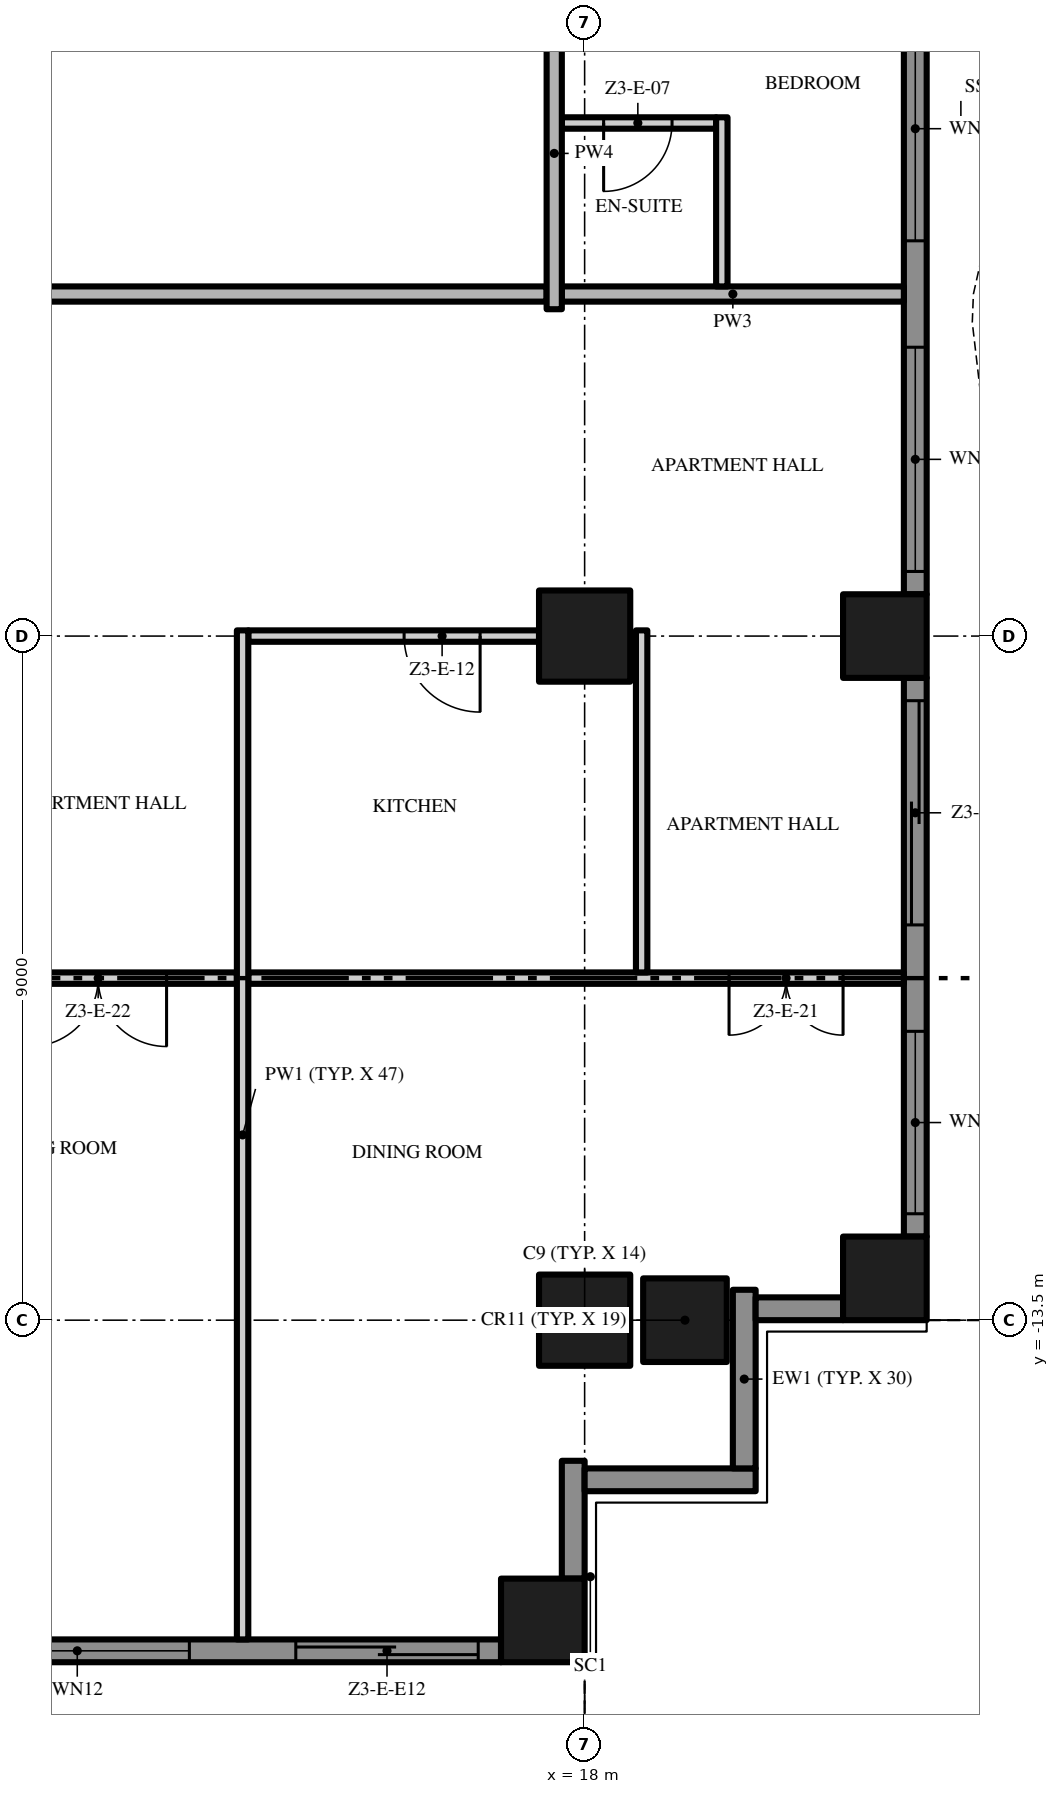
"""IFC4 building model, lengths in metres.
Left out: names, types, materials, properties, quantities, classifications, styles, units other than length and angle.
Written with IfcOpenShell. Run it as: python <this file> out.ifc"""

import sys

from ifc_helpers import new_model, si_unit, direction, frame, frame_2d, origin, origin_2d, place, context, subcontext, project, spatial, polyline, rectangle, outline, extrude, element, fill, save


model = new_model("IFC4")
c1 = context("Model", 3, precision=1e-05, world=origin(), true_north=direction((0.0, 1.0)))
c2 = subcontext(c1, "Body", "Model", "MODEL_VIEW")
j1 = project(units=[si_unit("LENGTHUNIT", "METRE"), si_unit("PLANEANGLEUNIT", "RADIAN")], contexts=[c1])
p1 = place(None, origin())
s1 = spatial("IfcSite", under=j1, at=p1, CompositionType="ELEMENT")
p2 = place(p1, origin())
s2 = spatial("IfcBuilding", under=s1, at=p2, CompositionType="ELEMENT")
p3 = place(p2, frame((0.0, 0.0, 170.6)))
s3 = spatial("IfcBuildingStorey", under=s2, at=p3, CompositionType="ELEMENT", Elevation=170.6)
p4 = place(p3, frame((18.0, -13.5, 0.0), z_axis=(0.0, 0.0, 1.0), x_axis=(1.0, 0.0, 0.0)))
e1 = element("IfcColumn", 1, at=p4, inside=s3, PredefinedType="COLUMN", context=c2, shape_type="SweptSolid", body=[
    extrude(rectangle(XDim=1.2, YDim=1.2, at=origin_2d()), origin(), (0.0, 0.0, 1.0), 3.5),
])
p5 = place(p3, frame((17.45, -17.45, 0.0), z_axis=(0.0, 0.0, 1.0), x_axis=(1.0, 0.0, 0.0)))
e2 = element("IfcColumn", 2, at=p5, inside=s3, PredefinedType="COLUMN", context=c2, shape_type="SweptSolid", body=[
    extrude(rectangle(XDim=1.1, YDim=1.1, at=origin_2d()), origin(), (0.0, 0.0, 1.0), 3.5),
])
p6 = place(p3, frame((18.0, -4.5, 0.0), z_axis=(0.0, 0.0, 1.0), x_axis=(1.0, 0.0, 0.0)))
e3 = element("IfcColumn", 3, at=p6, inside=s3, PredefinedType="COLUMN", context=c2, shape_type="SweptSolid", body=[
    extrude(rectangle(XDim=1.2, YDim=1.2, at=origin_2d()), origin(), (0.0, 0.0, 1.0), 3.5),
])
for number, where, z_axis, x_axis in (
    (4, (21.95, -12.95, 0.0), (0.0, 0.0, 1.0), (1.0, 0.0, 0.0)),
    (5, (19.32, -13.5, 0.0), (0.0, 0.0, 1.0), (1.0, 0.0, 0.0)),
    (6, (21.95, -4.5, 0.0), (0.0, 0.0, 1.0), (1.0, 0.0, 0.0)),
):
    element("IfcColumn", number, at=place(p3, frame(where, z_axis=z_axis, x_axis=x_axis)), inside=s3, PredefinedType="COLUMN", context=c2, shape_type="SweptSolid", body=[
        extrude(rectangle(XDim=1.1, YDim=1.1, at=origin_2d()), origin(), (0.0, 0.0, 1.0), 3.5),
    ])
p7 = place(p3, frame((16.9, -17.85, 0.0), z_axis=(0.0, 0.0, 1.0), x_axis=(-1.0, 0.0, 0.0)))
e7 = element("IfcWall", 7, at=p7, inside=s3, PredefinedType="SOLIDWALL", context=c2, shape_type="SweptSolid", body=[
    extrude(rectangle(XDim=7.35, YDim=0.3, at=frame_2d((3.675, 0.0))), origin(), (0.0, 0.0, 1.0), 3.5),
])
p8 = place(p7, frame((4.1, 0.0, 0.45)))
e8 = element("IfcOpeningElement", 8, at=p8, cuts=e7, PredefinedType="OPENING", context=c2, shape_type="SweptSolid", body=[
    extrude(rectangle(XDim=2.95, YDim=2.65, at=frame_2d((1.475, 1.325))), frame((0.0, 0.16, 0.0), z_axis=(0.0, -1.0, 0.0), x_axis=(1.0, 0.0, 0.0)), (0.0, 0.0, 1.0), 0.32),
])
p9 = place(p7, frame((0.3, 0.0, 0.0)))
e9 = element("IfcOpeningElement", 9, at=p9, cuts=e7, PredefinedType="OPENING", context=c2, shape_type="SweptSolid", body=[
    extrude(rectangle(XDim=2.4, YDim=2.4, at=frame_2d((1.2, 1.2))), frame((0.0, 0.16, 0.0), z_axis=(0.0, -1.0, 0.0), x_axis=(1.0, 0.0, 0.0)), (0.0, 0.0, 1.0), 0.32),
])
p10 = place(p3, frame((17.85, -15.35, 0.0), z_axis=(0.0, 0.0, 1.0), x_axis=(0.0, -1.0, 0.0)))
e10 = element("IfcWall", 10, at=p10, inside=s3, PredefinedType="SOLIDWALL", context=c2, shape_type="SweptSolid", body=[
    extrude(rectangle(XDim=1.55, YDim=0.3, at=frame_2d((0.775, 0.0))), origin(), (0.0, 0.0, 1.0), 3.5),
])
p11 = place(p3, frame((20.25, -15.6, 0.0), z_axis=(0.0, 0.0, 1.0), x_axis=(-1.0, 0.0, 0.0)))
e11 = element("IfcWall", 11, at=p11, inside=s3, PredefinedType="SOLIDWALL", context=c2, shape_type="SweptSolid", body=[
    extrude(rectangle(XDim=2.25, YDim=0.3, at=frame_2d((1.125, 0.0))), origin(), (0.0, 0.0, 1.0), 3.5),
])
p12 = place(p3, frame((20.1, -13.1, 0.0), z_axis=(0.0, 0.0, 1.0), x_axis=(0.0, -1.0, 0.0)))
e12 = element("IfcWall", 12, at=p12, inside=s3, PredefinedType="SOLIDWALL", context=c2, shape_type="SweptSolid", body=[
    extrude(rectangle(XDim=2.35, YDim=0.3, at=frame_2d((1.175, 0.0))), origin(), (0.0, 0.0, 1.0), 3.5),
])
p13 = place(p3, frame((21.4, -13.35, 0.0), z_axis=(0.0, 0.0, 1.0), x_axis=(-1.0, 0.0, 0.0)))
e13 = element("IfcWall", 13, at=p13, inside=s3, PredefinedType="SOLIDWALL", context=c2, shape_type="SweptSolid", body=[
    extrude(rectangle(XDim=1.15, YDim=0.3, at=frame_2d((0.575, 0.0))), origin(), (0.0, 0.0, 1.0), 3.5),
])
p14 = place(p3, frame((22.35, -5.05, 0.0), z_axis=(0.0, 0.0, 1.0), x_axis=(0.0, -1.0, 0.0)))
e14 = element("IfcWall", 14, at=p14, inside=s3, PredefinedType="SOLIDWALL", context=c2, shape_type="SweptSolid", body=[
    extrude(rectangle(XDim=7.35, YDim=0.3, at=frame_2d((3.675, 0.0))), origin(), (0.0, 0.0, 1.0), 3.5),
])
p15 = place(p14, frame((4.65, 0.0, 0.45)))
e15 = element("IfcOpeningElement", 15, at=p15, cuts=e14, PredefinedType="OPENING", context=c2, shape_type="SweptSolid", body=[
    extrude(rectangle(XDim=2.4, YDim=2.65, at=frame_2d((1.2, 1.325))), frame((0.0, 0.16, 0.0), z_axis=(0.0, -1.0, 0.0), x_axis=(1.0, 0.0, 0.0)), (0.0, 0.0, 1.0), 0.32),
])
p16 = place(p14, frame((0.3, 0.0, 0.0)))
e16 = element("IfcOpeningElement", 16, at=p16, cuts=e14, PredefinedType="OPENING", context=c2, shape_type="SweptSolid", body=[
    extrude(rectangle(XDim=2.95, YDim=2.4, at=frame_2d((1.475, 1.2))), frame((0.0, 0.16, 0.0), z_axis=(0.0, -1.0, 0.0), x_axis=(1.0, 0.0, 0.0)), (0.0, 0.0, 1.0), 0.32),
])
p17 = place(p3, frame((22.35, 3.95, 0.0), z_axis=(0.0, 0.0, 1.0), x_axis=(0.0, -1.0, 0.0)))
e17 = element("IfcWall", 17, at=p17, inside=s3, PredefinedType="SOLIDWALL", context=c2, shape_type="SweptSolid", body=[
    extrude(rectangle(XDim=7.9, YDim=0.3, at=frame_2d((3.95, 0.0))), origin(), (0.0, 0.0, 1.0), 3.5),
])
p18 = place(p17, frame((4.65, 0.0, 0.45)))
e18 = element("IfcOpeningElement", 18, at=p18, cuts=e17, PredefinedType="OPENING", context=c2, shape_type="SweptSolid", body=[
    extrude(rectangle(XDim=2.95, YDim=2.65, at=frame_2d((1.475, 1.325))), frame((0.0, 0.16, 0.0), z_axis=(0.0, -1.0, 0.0), x_axis=(1.0, 0.0, 0.0)), (0.0, 0.0, 1.0), 0.32),
])
p19 = place(p17, frame((0.3, 0.0, 0.45)))
e19 = element("IfcOpeningElement", 19, at=p19, cuts=e17, PredefinedType="OPENING", context=c2, shape_type="SweptSolid", body=[
    extrude(rectangle(XDim=2.95, YDim=2.65, at=frame_2d((1.475, 1.325))), frame((0.0, 0.16, 0.0), z_axis=(0.0, -1.0, 0.0), x_axis=(1.0, 0.0, 0.0)), (0.0, 0.0, 1.0), 0.32),
])
p20 = place(p3, origin())
e20 = element("IfcWall", 20, at=p20, inside=s3, PredefinedType="USERDEFINED", context=c2, shape_type="SweptSolid", body=[
    extrude(outline(polyline([(-18.0, -18.951), (-16.5, -19.612), (-15.0, -20.345), (-13.5, -20.869), (-12.375, -21.0), (-12.0, -20.985), (-10.5, -20.649), (-9.0, -19.988), (-7.5, -19.255), (-6.0, -18.731), (-4.875, -18.6), (-4.5, -18.615), (-3.0, -18.951), (-1.5, -19.612), (0.0, -20.345), (1.5, -20.869), (2.625, -21.0), (3.0, -20.985), (4.5, -20.649), (6.0, -19.988), (7.5, -19.255), (9.0, -18.731), (10.125, -18.6), (10.5, -18.615), (12.0, -18.951), (13.5, -19.612), (15.0, -20.345), (16.5, -20.869), (17.625, -21.0), (18.0, -20.985), (17.99, -20.735), (17.635, -20.749), (16.556, -20.624), (15.096, -20.114), (13.605, -19.385), (12.079, -18.713), (10.533, -18.366), (10.115, -18.349), (8.944, -18.486), (7.404, -19.024), (5.895, -19.761), (4.421, -20.41), (2.967, -20.736), (2.635, -20.749), (1.556, -20.624), (0.096, -20.114), (-1.395, -19.385), (-2.921, -18.713), (-4.467, -18.366), (-4.885, -18.349), (-6.056, -18.486), (-7.596, -19.024), (-9.105, -19.761), (-10.579, -20.41), (-12.033, -20.736), (-12.365, -20.749), (-13.444, -20.624), (-14.904, -20.114), (-16.395, -19.385), (-17.899, -18.723), (-18.0, -18.951)])), origin(), (0.0, 0.0, 1.0), 0.9),
])
p21 = place(p3, origin())
e21 = element("IfcWall", 21, at=p21, inside=s3, PredefinedType="USERDEFINED", context=c2, shape_type="SweptSolid", body=[
    extrude(outline(polyline([(23.451, -13.5), (24.112, -12.0), (24.845, -10.5), (25.369, -9.0), (25.5, -7.875), (25.485, -7.5), (25.149, -6.0), (24.488, -4.5), (23.755, -3.0), (23.231, -1.5), (23.1, -0.375), (23.115, 0.0), (23.451, 1.5), (24.112, 3.0), (24.845, 4.5), (25.369, 6.0), (25.5, 7.125), (25.485, 7.5), (25.149, 9.0), (24.488, 10.5), (23.755, 12.0), (23.231, 13.5), (23.1, 14.625), (23.115, 15.0), (23.451, 16.5), (24.112, 18.0), (23.883, 18.101), (23.213, 16.579), (22.866, 15.033), (22.849, 14.615), (22.986, 13.444), (23.524, 11.904), (24.261, 10.395), (24.91, 8.921), (25.236, 7.467), (25.249, 7.135), (25.124, 6.056), (24.614, 4.596), (23.885, 3.105), (23.213, 1.579), (22.866, 0.033), (22.849, -0.385), (22.986, -1.556), (23.524, -3.096), (24.261, -4.605), (24.91, -6.079), (25.236, -7.533), (25.249, -7.865), (25.124, -8.944), (24.614, -10.404), (23.885, -11.895), (23.223, -13.399), (23.451, -13.5)])), origin(), (0.0, 0.0, 1.0), 0.9),
])
p22 = place(p3, frame((13.425, -9.0, 0.0), z_axis=(0.0, 0.0, 1.0), x_axis=(-1.0, 0.0, 0.0)))
e22 = element("IfcWall", 22, at=p22, inside=s3, PredefinedType="PARTITIONING", context=c2, shape_type="SweptSolid", body=[
    extrude(rectangle(XDim=6.6, YDim=0.15, at=frame_2d((3.3, 0.0))), origin(), (0.0, 0.0, 1.0), 3.5),
])
p23 = place(p22, frame((0.925, 0.0, 0.0)))
e23 = element("IfcOpeningElement", 23, at=p23, cuts=e22, PredefinedType="OPENING", context=c2, shape_type="SweptSolid", body=[
    extrude(rectangle(XDim=1.8, YDim=2.4, at=frame_2d((0.9, 1.2))), frame((0.0, 0.085, 0.0), z_axis=(0.0, -1.0, 0.0), x_axis=(1.0, 0.0, 0.0)), (0.0, 0.0, 1.0), 0.17),
])
p24 = place(p3, frame((22.2, -9.0, 0.0), z_axis=(0.0, 0.0, 1.0), x_axis=(-1.0, 0.0, 0.0)))
e24 = element("IfcWall", 24, at=p24, inside=s3, PredefinedType="PARTITIONING", context=c2, shape_type="SweptSolid", body=[
    extrude(rectangle(XDim=8.625, YDim=0.15, at=frame_2d((4.312, 0.0))), origin(), (0.0, 0.0, 1.0), 3.5),
])
p25 = place(p24, frame((0.8, 0.0, 0.0)))
e25 = element("IfcOpeningElement", 25, at=p25, cuts=e24, PredefinedType="OPENING", context=c2, shape_type="SweptSolid", body=[
    extrude(rectangle(XDim=1.5, YDim=2.4, at=frame_2d((0.75, 1.2))), frame((0.0, 0.085, 0.0), z_axis=(0.0, -1.0, 0.0), x_axis=(1.0, 0.0, 0.0)), (0.0, 0.0, 1.0), 0.17),
])
p26 = place(p3, frame((17.4, -4.5, 0.0), z_axis=(0.0, 0.0, 1.0), x_axis=(-1.0, 0.0, 0.0)))
e26 = element("IfcWall", 26, at=p26, inside=s3, PredefinedType="PARTITIONING", context=c2, shape_type="SweptSolid", body=[
    extrude(rectangle(XDim=3.825, YDim=0.15, at=frame_2d((1.913, 0.0))), origin(), (0.0, 0.0, 1.0), 3.5),
])
p27 = place(p26, frame((0.775, 0.0, 0.0)))
e27 = element("IfcOpeningElement", 27, at=p27, cuts=e26, PredefinedType="OPENING", context=c2, shape_type="SweptSolid", body=[
    extrude(rectangle(XDim=1.0, YDim=2.4, at=frame_2d((0.5, 1.2))), frame((0.0, 0.085, 0.0), z_axis=(0.0, -1.0, 0.0), x_axis=(1.0, 0.0, 0.0)), (0.0, 0.0, 1.0), 0.17),
])
p28 = place(p3, frame((17.5, 0.0, 0.0), z_axis=(0.0, 0.0, 1.0), x_axis=(-1.0, 0.0, 0.0)))
e28 = element("IfcWall", 28, at=p28, inside=s3, PredefinedType="PARTITIONING", context=c2, shape_type="SweptSolid", body=[
    extrude(rectangle(XDim=35.0, YDim=0.2, at=frame_2d((17.5, 0.0))), origin(), (0.0, 0.0, 1.0), 3.5),
])
p29 = place(p28, frame((16.75, 0.0, 0.0)))
e29 = element("IfcOpeningElement", 29, at=p29, cuts=e28, PredefinedType="OPENING", context=c2, shape_type="SweptSolid", body=[
    extrude(rectangle(XDim=1.5, YDim=2.4, at=frame_2d((0.75, 1.2))), frame((0.0, 0.11, 0.0), z_axis=(0.0, -1.0, 0.0), x_axis=(1.0, 0.0, 0.0)), (0.0, 0.0, 1.0), 0.22),
])
p30 = place(p3, frame((17.7, 0.0, 0.0), z_axis=(0.0, 0.0, 1.0), x_axis=(1.0, 0.0, 0.0)))
e30 = element("IfcWall", 30, at=p30, inside=s3, PredefinedType="PARTITIONING", context=c2, shape_type="SweptSolid", body=[
    extrude(rectangle(XDim=4.5, YDim=0.2, at=frame_2d((2.25, 0.0))), origin(), (0.0, 0.0, 1.0), 3.5),
])
p31 = place(p3, frame((19.73, 2.25, 0.0), z_axis=(0.0, 0.0, 1.0), x_axis=(-1.0, 0.0, 0.0)))
e31 = element("IfcWall", 31, at=p31, inside=s3, PredefinedType="PARTITIONING", context=c2, shape_type="SweptSolid", body=[
    extrude(rectangle(XDim=2.03, YDim=0.15, at=frame_2d((1.015, 0.0))), origin(), (0.0, 0.0, 1.0), 3.5),
])
p32 = place(p31, frame((0.58, 0.0, 0.0)))
e32 = element("IfcOpeningElement", 32, at=p32, cuts=e31, PredefinedType="OPENING", context=c2, shape_type="SweptSolid", body=[
    extrude(rectangle(XDim=0.9, YDim=2.1, at=frame_2d((0.45, 1.05))), frame((0.0, 0.085, 0.0), z_axis=(0.0, -1.0, 0.0), x_axis=(1.0, 0.0, 0.0)), (0.0, 0.0, 1.0), 0.17),
])
p33 = place(p3, frame((13.5, -17.7, 0.0), z_axis=(0.0, 0.0, 1.0), x_axis=(0.0, 1.0, 0.0)))
e33 = element("IfcWall", 33, at=p33, inside=s3, PredefinedType="PARTITIONING", context=c2, shape_type="SweptSolid", body=[
    extrude(rectangle(XDim=13.275, YDim=0.15, at=frame_2d((6.638, 0.0))), origin(), (0.0, 0.0, 1.0), 3.5),
])
p34 = place(p3, frame((17.6, -0.2, 0.0), z_axis=(0.0, 0.0, 1.0), x_axis=(0.0, 1.0, 0.0)))
e34 = element("IfcWall", 34, at=p34, inside=s3, PredefinedType="PARTITIONING", context=c2, shape_type="SweptSolid", body=[
    extrude(rectangle(XDim=4.1, YDim=0.2, at=frame_2d((2.05, 0.0))), origin(), (0.0, 0.0, 1.0), 3.5),
])
p35 = place(p3, frame((18.75, -8.925, 0.0), z_axis=(0.0, 0.0, 1.0), x_axis=(0.0, 1.0, 0.0)))
e35 = element("IfcWall", 35, at=p35, inside=s3, PredefinedType="PARTITIONING", context=c2, shape_type="SweptSolid", body=[
    extrude(rectangle(XDim=4.5, YDim=0.15, at=frame_2d((2.25, 0.0))), origin(), (0.0, 0.0, 1.0), 3.5),
])
p36 = place(p3, frame((19.805, 0.1, 0.0), z_axis=(0.0, 0.0, 1.0), x_axis=(0.0, 1.0, 0.0)))
e36 = element("IfcWall", 36, at=p36, inside=s3, PredefinedType="PARTITIONING", context=c2, shape_type="SweptSolid", body=[
    extrude(rectangle(XDim=2.225, YDim=0.15, at=frame_2d((1.113, 0.0))), origin(), (0.0, 0.0, 1.0), 3.5),
])
p37 = place(p8, origin())
e37 = element("IfcWindow", 37, at=p37, inside=s3, PartitioningType="SINGLE_PANEL", PredefinedType="WINDOW", context=c2, shape_type="SweptSolid", body=[
    extrude(rectangle(XDim=2.95, YDim=2.65, at=frame_2d((1.475, 1.325))), frame((0.0, 0.03, 0.0), z_axis=(0.0, -1.0, 0.0), x_axis=(1.0, 0.0, 0.0)), (0.0, 0.0, 1.0), 0.06),
])
fill(e8, e37)
p38 = place(p9, origin())
e38 = element("IfcDoor", 38, at=p38, inside=s3, OperationType="SINGLE_SWING_LEFT", PredefinedType="DOOR", context=c2, shape_type="SweptSolid", body=[
    extrude(rectangle(XDim=2.4, YDim=2.4, at=frame_2d((1.2, 1.2))), frame((0.0, 0.025, 0.0), z_axis=(0.0, -1.0, 0.0), x_axis=(1.0, 0.0, 0.0)), (0.0, 0.0, 1.0), 0.05),
])
fill(e9, e38)
p39 = place(p15, origin())
e39 = element("IfcWindow", 39, at=p39, inside=s3, PartitioningType="SINGLE_PANEL", PredefinedType="WINDOW", context=c2, shape_type="SweptSolid", body=[
    extrude(rectangle(XDim=2.4, YDim=2.65, at=frame_2d((1.2, 1.325))), frame((0.0, 0.03, 0.0), z_axis=(0.0, -1.0, 0.0), x_axis=(1.0, 0.0, 0.0)), (0.0, 0.0, 1.0), 0.06),
])
fill(e15, e39)
p40 = place(p16, origin())
e40 = element("IfcDoor", 40, at=p40, inside=s3, OperationType="SINGLE_SWING_LEFT", PredefinedType="DOOR", context=c2, shape_type="SweptSolid", body=[
    extrude(rectangle(XDim=2.95, YDim=2.4, at=frame_2d((1.475, 1.2))), frame((0.0, 0.025, 0.0), z_axis=(0.0, -1.0, 0.0), x_axis=(1.0, 0.0, 0.0)), (0.0, 0.0, 1.0), 0.05),
])
fill(e16, e40)
p41 = place(p18, origin())
e41 = element("IfcWindow", 41, at=p41, inside=s3, PartitioningType="SINGLE_PANEL", PredefinedType="WINDOW", context=c2, shape_type="SweptSolid", body=[
    extrude(rectangle(XDim=2.95, YDim=2.65, at=frame_2d((1.475, 1.325))), frame((0.0, 0.03, 0.0), z_axis=(0.0, -1.0, 0.0), x_axis=(1.0, 0.0, 0.0)), (0.0, 0.0, 1.0), 0.06),
])
fill(e18, e41)
p42 = place(p19, origin())
e42 = element("IfcWindow", 42, at=p42, inside=s3, PartitioningType="SINGLE_PANEL", PredefinedType="WINDOW", context=c2, shape_type="SweptSolid", body=[
    extrude(rectangle(XDim=2.95, YDim=2.65, at=frame_2d((1.475, 1.325))), frame((0.0, 0.03, 0.0), z_axis=(0.0, -1.0, 0.0), x_axis=(1.0, 0.0, 0.0)), (0.0, 0.0, 1.0), 0.06),
])
fill(e19, e42)
p43 = place(p32, origin())
e43 = element("IfcDoor", 43, at=p43, inside=s3, OperationType="SINGLE_SWING_RIGHT", PredefinedType="DOOR", context=c2, shape_type="SweptSolid", body=[
    extrude(rectangle(XDim=0.9, YDim=2.1, at=frame_2d((0.45, 1.05))), frame((0.0, 0.025, 0.0), z_axis=(0.0, -1.0, 0.0), x_axis=(1.0, 0.0, 0.0)), (0.0, 0.0, 1.0), 0.05),
])
fill(e32, e43)
p44 = place(p27, origin())
e44 = element("IfcDoor", 44, at=p44, inside=s3, OperationType="SINGLE_SWING_LEFT", PredefinedType="DOOR", context=c2, shape_type="SweptSolid", body=[
    extrude(rectangle(XDim=1.0, YDim=2.4, at=frame_2d((0.5, 1.2))), frame((0.0, 0.025, 0.0), z_axis=(0.0, -1.0, 0.0), x_axis=(1.0, 0.0, 0.0)), (0.0, 0.0, 1.0), 0.05),
])
fill(e27, e44)
p45 = place(p25, origin())
e45 = element("IfcDoor", 45, at=p45, inside=s3, OperationType="DOUBLE_DOOR_SINGLE_SWING", PredefinedType="DOOR", context=c2, shape_type="SweptSolid", body=[
    extrude(rectangle(XDim=1.5, YDim=2.4, at=frame_2d((0.75, 1.2))), frame((0.0, 0.025, 0.0), z_axis=(0.0, -1.0, 0.0), x_axis=(1.0, 0.0, 0.0)), (0.0, 0.0, 1.0), 0.05),
])
fill(e25, e45)
p46 = place(p23, origin())
e46 = element("IfcDoor", 46, at=p46, inside=s3, OperationType="DOUBLE_DOOR_SINGLE_SWING", PredefinedType="DOOR", context=c2, shape_type="SweptSolid", body=[
    extrude(rectangle(XDim=1.8, YDim=2.4, at=frame_2d((0.9, 1.2))), frame((0.0, 0.025, 0.0), z_axis=(0.0, -1.0, 0.0), x_axis=(1.0, 0.0, 0.0)), (0.0, 0.0, 1.0), 0.05),
])
fill(e23, e46)
save(model, sys.argv[1])
